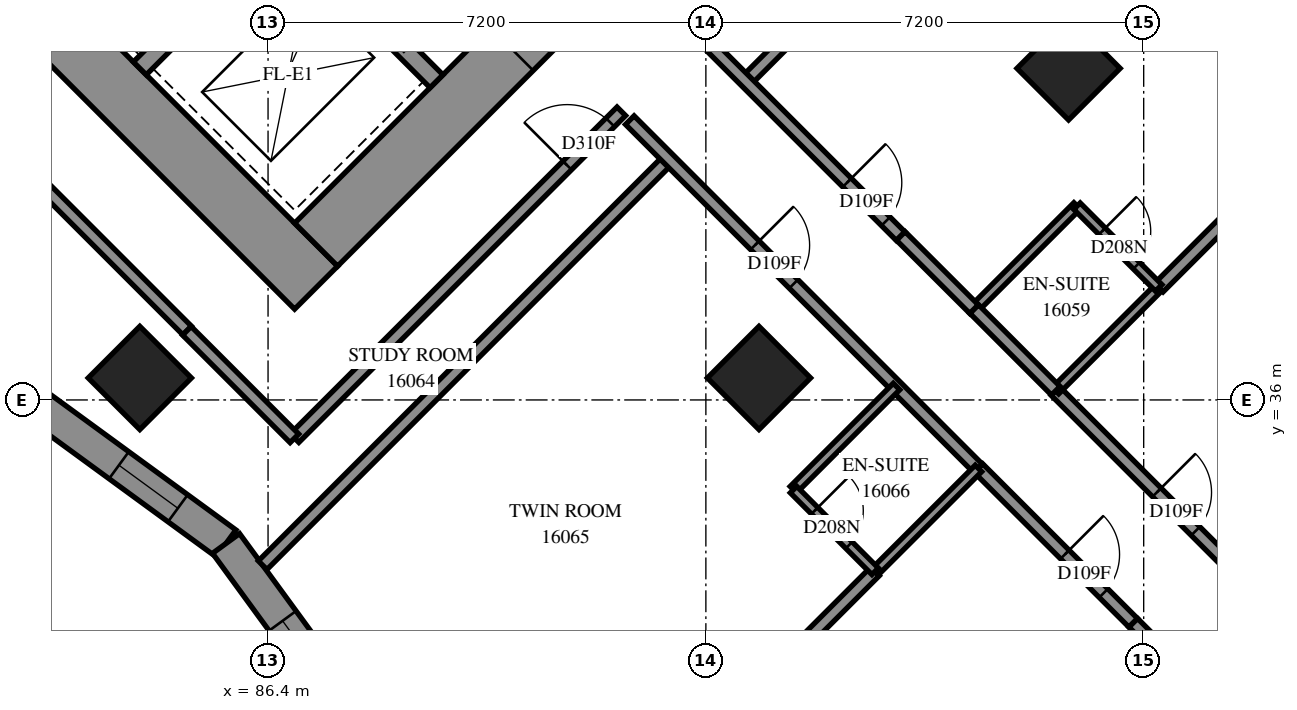
"""IFC4 building model, lengths in metres.
Left out: names, types, materials, properties, quantities, classifications, styles, units other than length and angle.
Written with IfcOpenShell. Run it as: python <this file> out.ifc"""

import sys

from ifc_helpers import new_model, si_unit, direction, frame, frame_2d, origin, origin_2d, place, context, subcontext, project, spatial, polyline, rectangle, outline, extrude, element, fill, save


model = new_model("IFC4")
c1 = context("Model", 3, precision=1e-05, world=origin(), true_north=direction((0.0, 1.0)))
c2 = subcontext(c1, "Body", "Model", "MODEL_VIEW")
j1 = project(units=[si_unit("LENGTHUNIT", "METRE"), si_unit("PLANEANGLEUNIT", "RADIAN")], contexts=[c1])
p1 = place(None, origin())
s1 = spatial("IfcSite", under=j1, at=p1, CompositionType="ELEMENT")
p2 = place(p1, origin())
s2 = spatial("IfcBuilding", under=s1, at=p2, CompositionType="ELEMENT")
p3 = place(p2, frame((0.0, 0.0, 61.0)))
s3 = spatial("IfcBuildingStorey", under=s2, at=p3, CompositionType="ELEMENT", Elevation=61.0)
for number, where, z_axis, x_axis in (
    (1, (84.291, 36.362, 0.0), (0.0, 0.0, 1.0), (0.707, -0.707, 0.0)),
    (2, (99.565, 41.453, 0.0), (0.0, 0.0, 1.0), (0.707, -0.707, 0.0)),
    (3, (94.474, 36.362, 0.0), (0.0, 0.0, 1.0), (0.707, -0.707, 0.0)),
):
    element("IfcColumn", number, at=place(p3, frame(where, z_axis=z_axis, x_axis=x_axis)), inside=s3, PredefinedType="COLUMN", context=c2, shape_type="SweptSolid", body=[
        extrude(rectangle(XDim=1.2, YDim=1.2, at=origin_2d()), origin(), (0.0, 0.0, 1.0), 3.1),
    ])
p4 = place(p3, frame((75.594, 49.443, -0.3), z_axis=(0.0, 0.0, 1.0), x_axis=(0.7071037324, -0.70710983, 0.0)))
e4 = element("IfcWall", 4, at=p4, inside=s3, PredefinedType="SHEAR", context=c2, shape_type="SweptSolid", body=[
    extrude(rectangle(XDim=16.4, YDim=1.0, at=frame_2d((8.2, 0.0))), origin(), (0.0, 0.0, 1.0), 2.7),
])
p5 = place(p3, frame((87.19, 38.554, -0.3), z_axis=(0.0, 0.0, 1.0), x_axis=(0.707103309, 0.7071102534, 0.0)))
e5 = element("IfcWall", 5, at=p5, inside=s3, PredefinedType="SHEAR", context=c2, shape_type="SweptSolid", body=[
    extrude(rectangle(XDim=14.4, YDim=1.0, at=frame_2d((7.2, 0.0))), origin(), (0.0, 0.0, 1.0), 2.7),
])
p6 = place(p5, frame((4.55, 0.0, 0.3)))
e6 = element("IfcOpeningElement", 6, at=p6, cuts=e5, PredefinedType="OPENING", context=c2, shape_type="SweptSolid", body=[
    extrude(rectangle(XDim=1.1, YDim=2.1, at=frame_2d((0.55, 1.05))), frame((0.0, 0.51, 0.0), z_axis=(0.0, -1.0, 0.0), x_axis=(1.0, 0.0, 0.0)), (0.0, 0.0, 1.0), 1.02),
])
p7 = place(p5, frame((11.35, 0.0, 0.3)))
e7 = element("IfcOpeningElement", 7, at=p7, cuts=e5, PredefinedType="OPENING", context=c2, shape_type="SweptSolid", body=[
    extrude(rectangle(XDim=1.1, YDim=2.1, at=frame_2d((0.55, 1.05))), frame((0.0, 0.51, 0.0), z_axis=(0.0, -1.0, 0.0), x_axis=(1.0, 0.0, 0.0)), (0.0, 0.0, 1.0), 1.02),
])
p8 = place(p3, frame((84.291, 41.453, 0.0), z_axis=(0.0, 0.0, 1.0), x_axis=(0.7071067812, 0.7071067812, 0.0)))
e8 = element("IfcWall", 8, at=p8, inside=s3, PredefinedType="SOLIDWALL", context=c2, shape_type="SweptSolid", body=[
    extrude(rectangle(XDim=3.3, YDim=0.3, at=frame_2d((1.65, 0.0))), origin(), (0.0, 0.0, 1.0), 3.1),
])
p9 = place(p3, frame((78.988, 51.423, 0.0), z_axis=(0.0, 0.0, 1.0), x_axis=(0.7071067812, -0.7071067812, 0.0)))
e9 = element("IfcWall", 9, at=p9, inside=s3, PredefinedType="SOLIDWALL", context=c2, shape_type="SweptSolid", body=[
    extrude(rectangle(XDim=14.4, YDim=0.3, at=frame_2d((7.2, 0.0))), origin(), (0.0, 0.0, 1.0), 3.1),
])
p10 = place(p9, frame((1.25, 0.0, 0.0)))
e10 = element("IfcOpeningElement", 10, at=p10, cuts=e9, PredefinedType="OPENING", context=c2, shape_type="SweptSolid", body=[
    extrude(rectangle(XDim=1.1, YDim=2.1, at=frame_2d((0.55, 1.05))), frame((0.0, 0.16, 0.0), z_axis=(0.0, -1.0, 0.0), x_axis=(1.0, 0.0, 0.0)), (0.0, 0.0, 1.0), 0.32),
])
p11 = place(p9, frame((4.85, 0.0, 0.0)))
e11 = element("IfcOpeningElement", 11, at=p11, cuts=e9, PredefinedType="OPENING", context=c2, shape_type="SweptSolid", body=[
    extrude(rectangle(XDim=1.1, YDim=2.1, at=frame_2d((0.55, 1.05))), frame((0.0, 0.16, 0.0), z_axis=(0.0, -1.0, 0.0), x_axis=(1.0, 0.0, 0.0)), (0.0, 0.0, 1.0), 0.32),
])
p12 = place(p9, frame((8.45, 0.0, 0.0)))
e12 = element("IfcOpeningElement", 12, at=p12, cuts=e9, PredefinedType="OPENING", context=c2, shape_type="SweptSolid", body=[
    extrude(rectangle(XDim=1.1, YDim=2.1, at=frame_2d((0.55, 1.05))), frame((0.0, 0.16, 0.0), z_axis=(0.0, -1.0, 0.0), x_axis=(1.0, 0.0, 0.0)), (0.0, 0.0, 1.0), 0.32),
])
p13 = place(p9, frame((12.05, 0.0, 0.0)))
e13 = element("IfcOpeningElement", 13, at=p13, cuts=e9, PredefinedType="OPENING", context=c2, shape_type="SweptSolid", body=[
    extrude(rectangle(XDim=1.1, YDim=2.1, at=frame_2d((0.55, 1.05))), frame((0.0, 0.16, 0.0), z_axis=(0.0, -1.0, 0.0), x_axis=(1.0, 0.0, 0.0)), (0.0, 0.0, 1.0), 0.32),
])
p14 = place(p3, frame((82.548, 35.949, 0.0), z_axis=(0.0, 0.0, 1.0), x_axis=(0.8075900138, -0.5897443257, 0.0)))
e14 = element("IfcWall", 14, at=p14, inside=s3, PredefinedType="SOLIDWALL", context=c2, shape_type="SweptSolid", body=[
    extrude(outline(polyline([(-0.043, -0.275), (3.871, -0.275), (3.957, 0.275), (0.043, 0.275), (-0.043, -0.275)])), origin(), (0.0, 0.0, 1.0), 3.1),
])
p15 = place(p14, frame((1.733, 0.0, 0.5)))
e15 = element("IfcOpeningElement", 15, at=p15, cuts=e14, PredefinedType="OPENING", context=c2, shape_type="SweptSolid", body=[
    extrude(rectangle(XDim=1.2, YDim=2.45, at=frame_2d((0.6, 1.225))), frame((0.0, 0.285, 0.0), z_axis=(0.0, -1.0, 0.0), x_axis=(1.0, 0.0, 0.0)), (0.0, 0.0, 1.0), 0.57),
])
p16 = place(p3, frame((85.709, 33.64, 0.0), z_axis=(0.0, 0.0, 1.0), x_axis=(0.5897321582, -0.807598899, 0.0)))
e16 = element("IfcWall", 16, at=p16, inside=s3, PredefinedType="SOLIDWALL", context=c2, shape_type="SweptSolid", body=[
    extrude(outline(polyline([(0.043, -0.275), (3.957, -0.275), (3.871, 0.275), (-0.043, 0.275), (0.043, -0.275)])), origin(), (0.0, 0.0, 1.0), 3.1),
])
p17 = place(p16, frame((1.576, 0.0, 0.5)))
e17 = element("IfcOpeningElement", 17, at=p17, cuts=e16, PredefinedType="OPENING", context=c2, shape_type="SweptSolid", body=[
    extrude(rectangle(XDim=1.2, YDim=2.45, at=frame_2d((0.6, 1.225))), frame((0.0, 0.285, 0.0), z_axis=(0.0, -1.0, 0.0), x_axis=(1.0, 0.0, 0.0)), (0.0, 0.0, 1.0), 0.57),
])
p18 = place(p3, frame((94.259, 41.243, 0.0), z_axis=(0.0, 0.0, 1.0), x_axis=(0.7070205168, 0.707193035, 0.0)))
e18 = element("IfcWall", 18, at=p18, inside=s3, PredefinedType="PARTITIONING", context=c2, shape_type="SweptSolid", body=[
    extrude(rectangle(XDim=12.173, YDim=0.2, at=frame_2d((6.086, 0.0))), origin(), (0.0, 0.0, 1.0), 3.1),
])
p19 = place(p3, frame((101.049, 37.847, 0.0), z_axis=(0.0, 0.0, 1.0), x_axis=(0.7071067812, 0.7071067812, 0.0)))
e19 = element("IfcWall", 19, at=p19, inside=s3, PredefinedType="PARTITIONING", context=c2, shape_type="SweptSolid", body=[
    extrude(rectangle(XDim=9.831, YDim=0.2, at=frame_2d((4.915, 0.0))), origin(), (0.0, 0.0, 1.0), 3.1),
])
p20 = place(p3, frame((86.311, 33.282, 0.0), z_axis=(0.0, 0.0, 1.0), x_axis=(0.7069956462, 0.7072178987, 0.0)))
e20 = element("IfcWall", 20, at=p20, inside=s3, PredefinedType="PARTITIONING", context=c2, shape_type="SweptSolid", body=[
    extrude(rectangle(XDim=9.449, YDim=0.2, at=frame_2d((4.724, 0.0))), origin(), (0.0, 0.0, 1.0), 3.1),
])
p21 = place(p3, frame((92.349, 40.601, 0.0), z_axis=(0.0, 0.0, 1.0), x_axis=(0.7071067812, -0.7071067812, 0.0)))
e21 = element("IfcWall", 21, at=p21, inside=s3, PredefinedType="PARTITIONING", context=c2, shape_type="SweptSolid", body=[
    extrude(rectangle(XDim=8.101, YDim=0.2, at=frame_2d((4.05, 0.0))), origin(), (0.0, 0.0, 1.0), 3.1),
])
p22 = place(p21, frame((2.909, 0.0, 0.0)))
e22 = element("IfcOpeningElement", 22, at=p22, cuts=e21, PredefinedType="OPENING", context=c2, shape_type="SweptSolid", body=[
    extrude(rectangle(XDim=0.9, YDim=2.1, at=frame_2d((0.45, 1.05))), frame((0.0, 0.11, 0.0), z_axis=(0.0, -1.0, 0.0), x_axis=(1.0, 0.0, 0.0)), (0.0, 0.0, 1.0), 0.22),
])
p23 = place(p3, frame((86.836, 35.372, 0.0), z_axis=(0.0, 0.0, 1.0), x_axis=(0.7071067812, 0.7071067812, 0.0)))
e23 = element("IfcWall", 23, at=p23, inside=s3, PredefinedType="PARTITIONING", context=c2, shape_type="SweptSolid", body=[
    extrude(rectangle(XDim=7.6, YDim=0.2, at=frame_2d((3.8, 0.0))), origin(), (0.0, 0.0, 1.0), 3.1),
])
p24 = place(p23, frame((6.342, 0.0, 0.0)))
e24 = element("IfcOpeningElement", 24, at=p24, cuts=e23, PredefinedType="OPENING", context=c2, shape_type="SweptSolid", body=[
    extrude(rectangle(XDim=1.0, YDim=2.1, at=frame_2d((0.5, 1.05))), frame((0.0, 0.11, 0.0), z_axis=(0.0, -1.0, 0.0), x_axis=(1.0, 0.0, 0.0)), (0.0, 0.0, 1.0), 0.22),
])
p25 = place(p3, frame((99.349, 36.147, 0.0), z_axis=(0.0, 0.0, 1.0), x_axis=(0.7071067812, -0.7071067812, 0.0)))
e25 = element("IfcWall", 25, at=p25, inside=s3, PredefinedType="PARTITIONING", context=c2, shape_type="SweptSolid", body=[
    extrude(rectangle(XDim=7.201, YDim=0.2, at=frame_2d((3.601, 0.0))), origin(), (0.0, 0.0, 1.0), 3.1),
])
p26 = place(p25, frame((2.358, 0.0, 0.0)))
e26 = element("IfcOpeningElement", 26, at=p26, cuts=e25, PredefinedType="OPENING", context=c2, shape_type="SweptSolid", body=[
    extrude(rectangle(XDim=0.9, YDim=2.1, at=frame_2d((0.45, 1.05))), frame((0.0, 0.11, 0.0), z_axis=(0.0, -1.0, 0.0), x_axis=(1.0, 0.0, 0.0)), (0.0, 0.0, 1.0), 0.22),
])
p27 = place(p3, frame((91.457, 28.256, 0.0), z_axis=(0.0, 0.0, 1.0), x_axis=(0.7071067812, 0.7071067812, 0.0)))
e27 = element("IfcWall", 27, at=p27, inside=s3, PredefinedType="PARTITIONING", context=c2, shape_type="SweptSolid", body=[
    extrude(rectangle(XDim=6.964, YDim=0.2, at=frame_2d((3.482, 0.0))), origin(), (0.0, 0.0, 1.0), 3.1),
])
p28 = place(p3, frame((85.07, 37.142, 0.0), z_axis=(0.0, 0.0, 1.0), x_axis=(-0.7070899851, 0.7071235769, 0.0)))
e28 = element("IfcWall", 28, at=p28, inside=s3, PredefinedType="PARTITIONING", context=c2, shape_type="SweptSolid", body=[
    extrude(rectangle(XDim=5.954, YDim=0.2, at=frame_2d((2.977, 0.0))), origin(), (0.0, 0.0, 1.0), 3.1),
])
p29 = place(p3, frame((93.481, 42.015, 0.0), z_axis=(0.0, 0.0, 1.0), x_axis=(0.7071067812, -0.7071067812, 0.0)))
e29 = element("IfcWall", 29, at=p29, inside=s3, PredefinedType="PARTITIONING", context=c2, shape_type="SweptSolid", body=[
    extrude(rectangle(XDim=4.698, YDim=0.2, at=frame_2d((2.349, 0.0))), origin(), (0.0, 0.0, 1.0), 3.1),
])
p30 = place(p29, frame((3.452, 0.0, 0.0)))
e30 = element("IfcOpeningElement", 30, at=p30, cuts=e29, PredefinedType="OPENING", context=c2, shape_type="SweptSolid", body=[
    extrude(rectangle(XDim=0.9, YDim=2.1, at=frame_2d((0.45, 1.05))), frame((0.0, 0.11, 0.0), z_axis=(0.0, -1.0, 0.0), x_axis=(1.0, 0.0, 0.0)), (0.0, 0.0, 1.0), 0.22),
])
p31 = place(p3, frame((98.082, 34.879, 0.0), z_axis=(0.0, 0.0, 1.0), x_axis=(0.7073845681, -0.7068288851, 0.0)))
e31 = element("IfcWall", 31, at=p31, inside=s3, PredefinedType="PARTITIONING", context=c2, shape_type="SweptSolid", body=[
    extrude(rectangle(XDim=3.599, YDim=0.2, at=frame_2d((1.8, 0.0))), origin(), (0.0, 0.0, 1.0), 3.1),
])
p32 = place(p31, frame((2.009, 0.0, 0.0)))
e32 = element("IfcOpeningElement", 32, at=p32, cuts=e31, PredefinedType="OPENING", context=c2, shape_type="SweptSolid", body=[
    extrude(rectangle(XDim=0.9, YDim=2.1, at=frame_2d((0.45, 1.05))), frame((0.0, 0.11, 0.0), z_axis=(0.0, -1.0, 0.0), x_axis=(1.0, 0.0, 0.0)), (0.0, 0.0, 1.0), 0.22),
])
p33 = place(p3, frame((85.065, 37.137, 0.0), z_axis=(0.0, 0.0, 1.0), x_axis=(0.7071067812, -0.7071067812, 0.0)))
e33 = element("IfcWall", 33, at=p33, inside=s3, PredefinedType="PARTITIONING", context=c2, shape_type="SweptSolid", body=[
    extrude(rectangle(XDim=2.5, YDim=0.2, at=frame_2d((1.25, 0.0))), origin(), (0.0, 0.0, 1.0), 3.1),
])
for number, where, z_axis, x_axis in (
    (34, (96.384, 33.178, 0.0), (0.0, 0.0, 1.0), (0.708, 0.707, 0.0)),
    (35, (99.349, 36.153, 0.0), (0.0, 0.0, 1.0), (0.708, 0.707, 0.0)),
):
    element("IfcWall", number, at=place(p3, frame(where, z_axis=z_axis, x_axis=x_axis)), inside=s3, PredefinedType="PARTITIONING", context=c2, shape_type="SweptSolid", body=[
        extrude(rectangle(XDim=2.4, YDim=0.15, at=frame_2d((1.2, 0.0))), origin(), (0.0, 0.0, 1.0), 3.1),
    ])
for number, where, z_axis, x_axis in (
    (36, (95.039, 34.525, 0.0), (0.0, 0.0, 1.0), (0.707, 0.707, 0.0)),
    (37, (98.009, 37.495, 0.0), (0.0, 0.0, 1.0), (0.707, 0.707, 0.0)),
):
    element("IfcWall", number, at=place(p3, frame(where, z_axis=z_axis, x_axis=x_axis)), inside=s3, PredefinedType="PARTITIONING", context=c2, shape_type="SweptSolid", body=[
        extrude(rectangle(XDim=2.398, YDim=0.15, at=frame_2d((1.199, 0.0))), origin(), (0.0, 0.0, 1.0), 3.1),
    ])
p34 = place(p3, frame((99.703, 39.187, 0.0), z_axis=(0.0, 0.0, 1.0), x_axis=(0.7071067812, -0.7071067812, 0.0)))
e38 = element("IfcWall", 38, at=p34, inside=s3, PredefinedType="PARTITIONING", context=c2, shape_type="SweptSolid", body=[
    extrude(rectangle(XDim=1.901, YDim=0.15, at=frame_2d((0.95, 0.0))), origin(), (0.0, 0.0, 1.0), 3.1),
])
p35 = place(p34, frame((0.584, 0.0, 0.0)))
e39 = element("IfcOpeningElement", 39, at=p35, cuts=e38, PredefinedType="OPENING", context=c2, shape_type="SweptSolid", body=[
    extrude(rectangle(XDim=0.8, YDim=2.1, at=frame_2d((0.4, 1.05))), frame((0.0, 0.085, 0.0), z_axis=(0.0, -1.0, 0.0), x_axis=(1.0, 0.0, 0.0)), (0.0, 0.0, 1.0), 0.17),
])
p36 = place(p3, frame((98.012, 37.496, 0.0), z_axis=(0.0, 0.0, 1.0), x_axis=(0.7065800724, -0.7076330979, 0.0)))
e40 = element("IfcWall", 40, at=p36, inside=s3, PredefinedType="PARTITIONING", context=c2, shape_type="SweptSolid", body=[
    extrude(rectangle(XDim=1.899, YDim=0.2, at=frame_2d((0.95, 0.0))), origin(), (0.0, 0.0, 1.0), 3.1),
])
p37 = place(p3, frame((95.042, 34.526, 0.0), z_axis=(0.0, 0.0, 1.0), x_axis=(0.7065800724, -0.7076330979, 0.0)))
e41 = element("IfcWall", 41, at=p37, inside=s3, PredefinedType="PARTITIONING", context=c2, shape_type="SweptSolid", body=[
    extrude(rectangle(XDim=1.899, YDim=0.15, at=frame_2d((0.95, 0.0))), origin(), (0.0, 0.0, 1.0), 3.1),
])
p38 = place(p37, frame((0.491, 0.0, 0.0)))
e42 = element("IfcOpeningElement", 42, at=p38, cuts=e41, PredefinedType="OPENING", context=c2, shape_type="SweptSolid", body=[
    extrude(rectangle(XDim=0.8, YDim=2.1, at=frame_2d((0.4, 1.05))), frame((0.0, 0.085, 0.0), z_axis=(0.0, -1.0, 0.0), x_axis=(1.0, 0.0, 0.0)), (0.0, 0.0, 1.0), 0.17),
])
p39 = place(p3, frame((96.806, 38.696, 0.0), z_axis=(0.0, 0.0, 1.0), x_axis=(0.7076943229, -0.7065187509, 0.0)))
e43 = element("IfcWall", 43, at=p39, inside=s3, PredefinedType="PARTITIONING", context=c2, shape_type="SweptSolid", body=[
    extrude(rectangle(XDim=1.701, YDim=0.2, at=frame_2d((0.851, 0.0))), origin(), (0.0, 0.0, 1.0), 3.1),
])
p40 = place(p3, frame((100.629, 32.335, 0.0), z_axis=(0.0, 0.0, 1.0), x_axis=(0.7071067812, -0.7071067812, 0.0)))
e44 = element("IfcWall", 44, at=p40, inside=s3, PredefinedType="PARTITIONING", context=c2, shape_type="SweptSolid", body=[
    extrude(rectangle(XDim=1.7, YDim=0.2, at=frame_2d((0.85, 0.0))), origin(), (0.0, 0.0, 1.0), 3.1),
])
p41 = place(p15, origin())
e45 = element("IfcWindow", 45, at=p41, inside=s3, PartitioningType="SINGLE_PANEL", PredefinedType="WINDOW", context=c2, shape_type="SweptSolid", body=[
    extrude(rectangle(XDim=1.2, YDim=2.45, at=frame_2d((0.6, 1.225))), frame((0.0, 0.155, 0.0), z_axis=(0.0, -1.0, 0.0), x_axis=(1.0, 0.0, 0.0)), (0.0, 0.0, 1.0), 0.06),
])
fill(e15, e45)
p42 = place(p17, origin())
e46 = element("IfcWindow", 46, at=p42, inside=s3, PartitioningType="SINGLE_PANEL", PredefinedType="WINDOW", context=c2, shape_type="SweptSolid", body=[
    extrude(rectangle(XDim=1.2, YDim=2.45, at=frame_2d((0.6, 1.225))), frame((0.0, 0.155, 0.0), z_axis=(0.0, -1.0, 0.0), x_axis=(1.0, 0.0, 0.0)), (0.0, 0.0, 1.0), 0.06),
])
fill(e17, e46)
p43 = place(p30, origin())
e47 = element("IfcDoor", 47, at=p43, inside=s3, OperationType="SINGLE_SWING_RIGHT", PredefinedType="DOOR", context=c2, shape_type="SweptSolid", body=[
    extrude(rectangle(XDim=0.9, YDim=2.1, at=frame_2d((0.45, 1.05))), frame((0.0, 0.025, 0.0), z_axis=(0.0, -1.0, 0.0), x_axis=(1.0, 0.0, 0.0)), (0.0, 0.0, 1.0), 0.05),
])
fill(e30, e47)
p44 = place(p35, origin())
e48 = element("IfcDoor", 48, at=p44, inside=s3, OperationType="SINGLE_SWING_RIGHT", PredefinedType="DOOR", context=c2, shape_type="SweptSolid", body=[
    extrude(rectangle(XDim=0.8, YDim=2.1, at=frame_2d((0.4, 1.05))), frame((0.0, 0.025, 0.0), z_axis=(0.0, -1.0, 0.0), x_axis=(1.0, 0.0, 0.0)), (0.0, 0.0, 1.0), 0.05),
])
fill(e39, e48)
p45 = place(p26, origin())
e49 = element("IfcDoor", 49, at=p45, inside=s3, OperationType="SINGLE_SWING_RIGHT", PredefinedType="DOOR", context=c2, shape_type="SweptSolid", body=[
    extrude(rectangle(XDim=0.9, YDim=2.1, at=frame_2d((0.45, 1.05))), frame((0.0, 0.025, 0.0), z_axis=(0.0, -1.0, 0.0), x_axis=(1.0, 0.0, 0.0)), (0.0, 0.0, 1.0), 0.05),
])
fill(e26, e49)
p46 = place(p24, origin())
e50 = element("IfcDoor", 50, at=p46, inside=s3, OperationType="SINGLE_SWING_RIGHT", PredefinedType="DOOR", context=c2, shape_type="SweptSolid", body=[
    extrude(rectangle(XDim=1.0, YDim=2.1, at=frame_2d((0.5, 1.05))), frame((0.0, 0.025, 0.0), z_axis=(0.0, -1.0, 0.0), x_axis=(1.0, 0.0, 0.0)), (0.0, 0.0, 1.0), 0.05),
])
fill(e24, e50)
p47 = place(p22, origin())
e51 = element("IfcDoor", 51, at=p47, inside=s3, OperationType="SINGLE_SWING_LEFT", PredefinedType="DOOR", context=c2, shape_type="SweptSolid", body=[
    extrude(rectangle(XDim=0.9, YDim=2.1, at=frame_2d((0.45, 1.05))), frame((0.0, 0.025, 0.0), z_axis=(0.0, -1.0, 0.0), x_axis=(1.0, 0.0, 0.0)), (0.0, 0.0, 1.0), 0.05),
])
fill(e22, e51)
p48 = place(p38, origin())
e52 = element("IfcDoor", 52, at=p48, inside=s3, OperationType="SINGLE_SWING_RIGHT", PredefinedType="DOOR", context=c2, shape_type="SweptSolid", body=[
    extrude(rectangle(XDim=0.8, YDim=2.1, at=frame_2d((0.4, 1.05))), frame((0.0, 0.025, 0.0), z_axis=(0.0, -1.0, 0.0), x_axis=(1.0, 0.0, 0.0)), (0.0, 0.0, 1.0), 0.05),
])
fill(e42, e52)
p49 = place(p32, origin())
e53 = element("IfcDoor", 53, at=p49, inside=s3, OperationType="SINGLE_SWING_LEFT", PredefinedType="DOOR", context=c2, shape_type="SweptSolid", body=[
    extrude(rectangle(XDim=0.9, YDim=2.1, at=frame_2d((0.45, 1.05))), frame((0.0, 0.025, 0.0), z_axis=(0.0, -1.0, 0.0), x_axis=(1.0, 0.0, 0.0)), (0.0, 0.0, 1.0), 0.05),
])
fill(e32, e53)
save(model, sys.argv[1])
